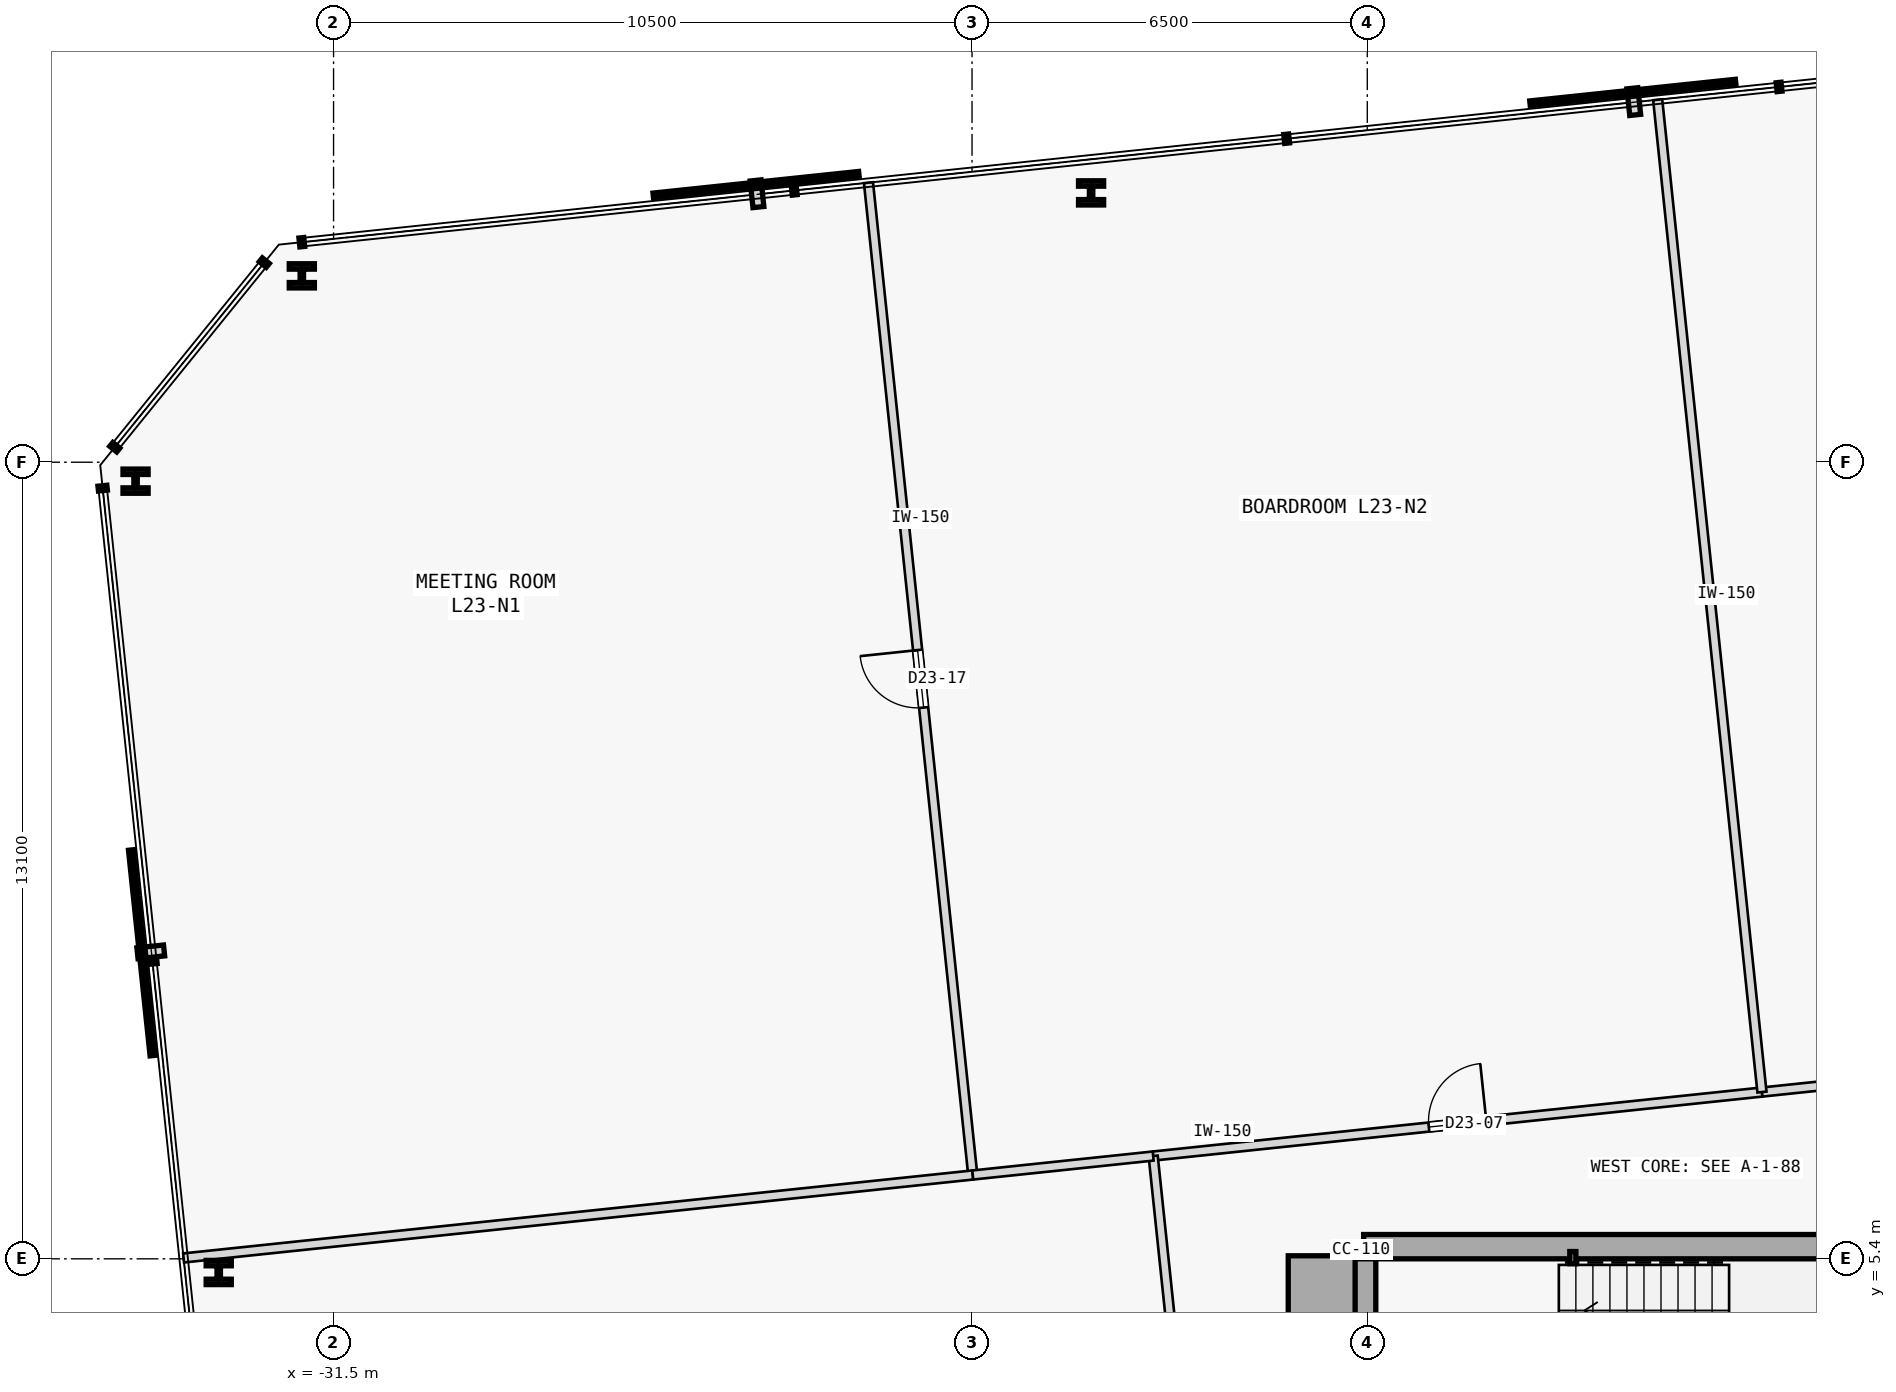
"""IFC4 building model, lengths in metres.
Left out: names, types, materials, properties, quantities, classifications, styles, units other than length and angle.
Written with IfcOpenShell. Run it as: python <this file> out.ifc"""

import sys

from ifc_helpers import new_model, si_unit, direction, frame, frame_2d, origin, origin_2d, place, context, subcontext, project, spatial, rectangle, hollow_rectangle, i_section, extrude, element, fill, save


model = new_model("IFC4")
c1 = context("Model", 3, precision=1e-05, world=origin(), true_north=direction((0.0, 1.0)))
c2 = subcontext(c1, "Body", "Model", "MODEL_VIEW")
j1 = project(units=[si_unit("LENGTHUNIT", "METRE"), si_unit("PLANEANGLEUNIT", "RADIAN")], contexts=[c1])
p1 = place(None, origin())
s1 = spatial("IfcSite", under=j1, at=p1, CompositionType="ELEMENT")
p2 = place(p1, origin())
s2 = spatial("IfcBuilding", under=s1, at=p2, CompositionType="ELEMENT")
p3 = place(p2, frame((0.0, 0.0, 94.8)))
s3 = spatial("IfcBuildingStorey", under=s2, at=p3, CompositionType="ELEMENT", Elevation=94.8)
p4 = place(p3, frame((-15.25, 4.9, 0.0), z_axis=(0.0, 0.0, 1.0), x_axis=(1.0, 0.0, 0.0)))
e1 = element("IfcColumn", 1, at=p4, inside=s3, PredefinedType="COLUMN", context=c2, shape_type="SweptSolid", body=[
    extrude(rectangle(XDim=1.1, YDim=1.1, at=origin_2d()), origin(), (0.0, 0.0, 1.0), 3.7),
])
p5 = place(p3, frame((-14.56, 5.6, 0.0), z_axis=(0.0, 0.0, 1.0), x_axis=(1.0, 0.0, 0.0)))
e2 = element("IfcWall", 2, at=p5, inside=s3, PredefinedType="SHEAR", context=c2, shape_type="SweptSolid", body=[
    extrude(rectangle(XDim=11.41, YDim=0.4, at=frame_2d((5.705, 0.0))), origin(), (0.0, 0.0, 1.0), 3.475),
])
p6 = place(p3, frame((-14.56, -5.4, 0.0), z_axis=(0.0, 0.0, 1.0), x_axis=(0.0, 1.0, 0.0)))
e3 = element("IfcWall", 3, at=p6, inside=s3, PredefinedType="SHEAR", context=c2, shape_type="SweptSolid", body=[
    extrude(rectangle(XDim=10.8, YDim=0.4, at=frame_2d((5.4, 0.0))), origin(), (0.0, 0.0, 1.0), 3.475),
])
p7 = place(p3, frame((-11.12, 5.42, 0.0), z_axis=(0.0, 0.0, 1.0), x_axis=(1.0, 0.0, 0.0)))
e4 = element("IfcColumn", 4, at=p7, inside=s3, PredefinedType="COLUMN", context=c2, shape_type="SweptSolid", body=[
    extrude(hollow_rectangle(XDim=0.1, YDim=0.2, WallThickness=0.008, at=origin_2d()), origin(), (0.0, 0.0, 1.0), 3.7),
])
for number, where, z_axis, x_axis in (
    (5, (-19.042, 22.929, 0.0), (0.0, 0.0, 1.0), (1.0, 0.0, 0.0)),
    (6, (-32.022, 21.565, 0.0), (0.0, 0.0, 1.0), (1.0, 0.0, 0.0)),
    (7, (-34.756, 18.189, 0.0), (0.0, 0.0, 1.0), (1.0, 0.0, 0.0)),
    (8, (-33.388, 5.175, 0.0), (0.0, 0.0, 1.0), (1.0, 0.0, 0.0)),
):
    element("IfcColumn", number, at=place(p3, frame(where, z_axis=z_axis, x_axis=x_axis)), inside=s3, PredefinedType="COLUMN", context=c2, shape_type="SweptSolid", body=[
        extrude(i_section(OverallWidth=0.413, OverallDepth=0.398, WebThickness=0.056, FlangeThickness=0.089, FilletRadius=0.015, at=origin_2d()), origin(), (0.0, 0.0, 1.0), 3.7),
    ])
p8 = place(p3, frame((-18.021, 7.09, 0.0), z_axis=(0.0, 0.0, 1.0), x_axis=(0.994522183983, 0.104525717249, 0.0)))
e9 = element("IfcWall", 9, at=p8, inside=s3, PredefinedType="PARTITIONING", context=c2, shape_type="SweptSolid", body=[
    extrude(rectangle(XDim=10.067, YDim=0.15, at=frame_2d((5.033, 0.0))), origin(), (0.0, 0.0, 1.0), 3.475),
])
p9 = place(p8, frame((4.559, 0.0, 0.0)))
e10 = element("IfcOpeningElement", 10, at=p9, cuts=e9, PredefinedType="OPENING", context=c2, shape_type="SweptSolid", body=[
    extrude(rectangle(XDim=0.95, YDim=2.15, at=frame_2d((0.475, 1.075))), frame((0.0, 0.085, 0.0), z_axis=(0.0, -1.0, 0.0), x_axis=(1.0, 0.0, 0.0)), (0.0, 0.0, 1.0), 0.17),
])
p10 = place(p3, frame((-8.01, 8.143, 0.0), z_axis=(0.0, 0.0, 1.0), x_axis=(0.994521795881, 0.104529409818, 0.0)))
e11 = element("IfcWall", 11, at=p10, inside=s3, PredefinedType="PARTITIONING", context=c2, shape_type="SweptSolid", body=[
    extrude(rectangle(XDim=15.95, YDim=0.15, at=frame_2d((7.975, 0.0))), origin(), (0.0, 0.0, 1.0), 3.475),
])
p11 = place(p10, frame((7.5, 0.0, 0.0)))
e12 = element("IfcOpeningElement", 12, at=p11, cuts=e11, PredefinedType="OPENING", context=c2, shape_type="SweptSolid", body=[
    extrude(rectangle(XDim=0.95, YDim=2.15, at=frame_2d((0.475, 1.075))), frame((0.0, 0.085, 0.0), z_axis=(0.0, -1.0, 0.0), x_axis=(1.0, 0.0, 0.0)), (0.0, 0.0, 1.0), 0.17),
])
p12 = place(p3, frame((-17.143, -1.263, 0.0), z_axis=(0.0, 0.0, 1.0), x_axis=(-0.104527419485, 0.994522005074, 0.0)))
e13 = element("IfcWall", 13, at=p12, inside=s3, PredefinedType="PARTITIONING", context=c2, shape_type="SweptSolid", body=[
    extrude(rectangle(XDim=8.399, YDim=0.15, at=frame_2d((4.199, 0.0))), origin(), (0.0, 0.0, 1.0), 3.475),
])
p13 = place(p12, frame((3.725, 0.0, 0.0)))
e14 = element("IfcOpeningElement", 14, at=p13, cuts=e13, PredefinedType="OPENING", context=c2, shape_type="SweptSolid", body=[
    extrude(rectangle(XDim=0.95, YDim=2.15, at=frame_2d((0.475, 1.075))), frame((0.0, 0.085, 0.0), z_axis=(0.0, -1.0, 0.0), x_axis=(1.0, 0.0, 0.0)), (0.0, 0.0, 1.0), 0.17),
])
p14 = place(p3, frame((-20.988, 6.779, 0.0), z_axis=(0.0, 0.0, 1.0), x_axis=(-0.104521364336, 0.99452264147, 0.0)))
e15 = element("IfcWall", 15, at=p14, inside=s3, PredefinedType="PARTITIONING", context=c2, shape_type="SweptSolid", body=[
    extrude(rectangle(XDim=16.409, YDim=0.15, at=frame_2d((8.205, 0.0))), origin(), (0.0, 0.0, 1.0), 3.475),
])
p15 = place(p14, frame((7.729, 0.0, 0.0)))
e16 = element("IfcOpeningElement", 16, at=p15, cuts=e15, PredefinedType="OPENING", context=c2, shape_type="SweptSolid", body=[
    extrude(rectangle(XDim=0.95, YDim=2.15, at=frame_2d((0.475, 1.075))), frame((0.0, 0.085, 0.0), z_axis=(0.0, -1.0, 0.0), x_axis=(1.0, 0.0, 0.0)), (0.0, 0.0, 1.0), 0.17),
])
p16 = place(p3, frame((-33.967, 5.414, 0.0), z_axis=(0.0, 0.0, 1.0), x_axis=(0.994520613947, 0.104540654453, 0.0)))
e17 = element("IfcWall", 17, at=p16, inside=s3, PredefinedType="PARTITIONING", context=c2, shape_type="SweptSolid", body=[
    extrude(rectangle(XDim=13.05, YDim=0.15, at=frame_2d((6.525, 0.0))), origin(), (0.0, 0.0, 1.0), 3.475),
])
p17 = place(p3, frame((-8.01, 8.143, 0.0), z_axis=(0.0, 0.0, 1.0), x_axis=(-0.104521364336, 0.99452264147, 0.0)))
e18 = element("IfcWall", 18, at=p17, inside=s3, PredefinedType="PARTITIONING", context=c2, shape_type="SweptSolid", body=[
    extrude(rectangle(XDim=16.409, YDim=0.15, at=frame_2d((8.205, 0.0))), origin(), (0.0, 0.0, 1.0), 3.475),
])
p18 = place(p3, frame((-20.988, 6.779, 0.0), z_axis=(0.0, 0.0, 1.0), x_axis=(0.994523823632, 0.104510115436, 0.0)))
e19 = element("IfcWall", 19, at=p18, inside=s3, PredefinedType="PARTITIONING", context=c2, shape_type="SweptSolid", body=[
    extrude(rectangle(XDim=2.983, YDim=0.15, at=frame_2d((1.492, 0.0))), origin(), (0.0, 0.0, 1.0), 3.475),
])
p19 = place(p9, origin())
e20 = element("IfcDoor", 20, at=p19, inside=s3, OperationType="SINGLE_SWING_RIGHT", PredefinedType="DOOR", context=c2, shape_type="SweptSolid", body=[
    extrude(rectangle(XDim=0.95, YDim=2.15, at=frame_2d((0.475, 1.075))), frame((0.0, 0.025, 0.0), z_axis=(0.0, -1.0, 0.0), x_axis=(1.0, 0.0, 0.0)), (0.0, 0.0, 1.0), 0.05),
])
fill(e10, e20)
p20 = place(p15, origin())
e21 = element("IfcDoor", 21, at=p20, inside=s3, OperationType="SINGLE_SWING_RIGHT", PredefinedType="DOOR", context=c2, shape_type="SweptSolid", body=[
    extrude(rectangle(XDim=0.95, YDim=2.15, at=frame_2d((0.475, 1.075))), frame((0.0, 0.025, 0.0), z_axis=(0.0, -1.0, 0.0), x_axis=(1.0, 0.0, 0.0)), (0.0, 0.0, 1.0), 0.05),
])
fill(e16, e21)
save(model, sys.argv[1])
